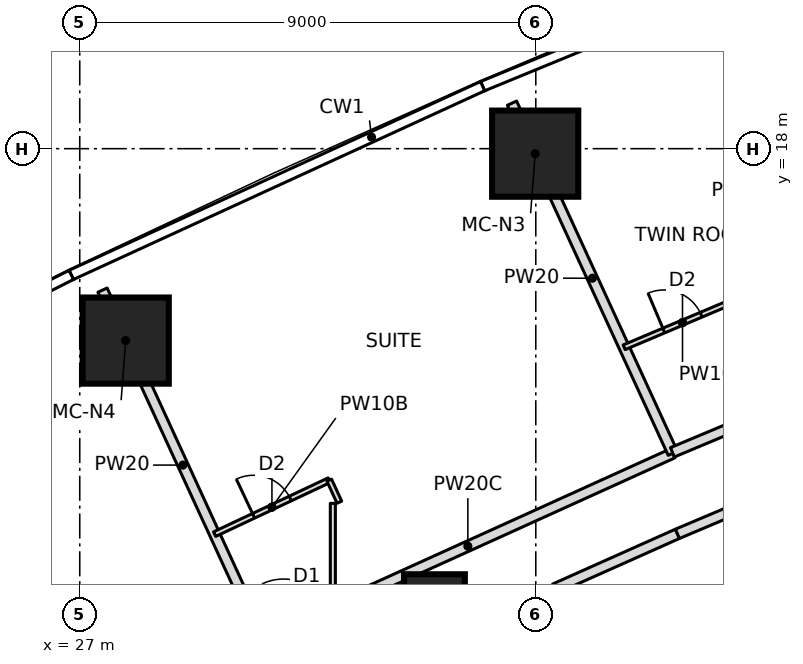
"""IFC4 building model, lengths in metres.
Left out: names, types, materials, properties, quantities, classifications, styles, units other than length and angle.
Written with IfcOpenShell. Run it as: python <this file> out.ifc"""

import sys

from ifc_helpers import new_model, si_unit, direction, frame, frame_2d, origin, origin_2d, place, context, subcontext, project, spatial, rectangle, extrude, element, fill, save


model = new_model("IFC4")
c1 = context("Model", 3, precision=1e-05, world=origin(), true_north=direction((0.0, 1.0)))
c2 = subcontext(c1, "Body", "Model", "MODEL_VIEW")
j1 = project(units=[si_unit("LENGTHUNIT", "METRE"), si_unit("PLANEANGLEUNIT", "RADIAN")], contexts=[c1])
p1 = place(None, origin())
s1 = spatial("IfcSite", under=j1, at=p1, CompositionType="ELEMENT")
p2 = place(p1, origin())
s2 = spatial("IfcBuilding", under=s1, at=p2, CompositionType="ELEMENT")
p3 = place(p2, frame((0.0, 0.0, 99.1)))
s3 = spatial("IfcBuildingStorey", under=s2, at=p3, CompositionType="ELEMENT", Elevation=99.1)
for number, where, z_axis, x_axis in (
    (1, (35.988, 17.902, 0.0), (0.0, 0.0, 1.0), (1.0, 0.0, 0.0)),
    (2, (27.907, 14.212, 0.0), (0.0, 0.0, 1.0), (1.0, 0.0, 0.0)),
):
    element("IfcColumn", number, at=place(p3, frame(where, z_axis=z_axis, x_axis=x_axis)), inside=s3, PredefinedType="COLUMN", context=c2, shape_type="SweptSolid", body=[
        extrude(rectangle(XDim=1.7, YDim=1.7, at=origin_2d()), origin(), (0.0, 0.0, 1.0), 3.55),
    ])
p4 = place(p3, frame((34.0, 9.0, 0.0), z_axis=(0.0, 0.0, 1.0), x_axis=(1.0, 0.0, 0.0)))
e3 = element("IfcColumn", 3, at=p4, inside=s3, PredefinedType="COLUMN", context=c2, shape_type="SweptSolid", body=[
    extrude(rectangle(XDim=1.2, YDim=1.2, at=origin_2d()), origin(), (0.0, 0.0, 1.0), 3.55),
])
p5 = place(p3, frame((30.622, 8.302, 0.0), z_axis=(0.0, 0.0, 1.0), x_axis=(-0.417429919618, 0.90870911859, 0.0)))
e4 = element("IfcWall", 4, at=p5, inside=s3, PredefinedType="PARTITIONING", context=c2, shape_type="SweptSolid", body=[
    extrude(rectangle(XDim=7.6, YDim=0.2, at=frame_2d((3.8, 0.0))), origin(), (0.0, 0.0, 1.0), 3.25),
])
p6 = place(p3, frame((30.614, 8.32, 0.0), z_axis=(0.0, 0.0, 1.0), x_axis=(0.910751030363, 0.41295588226, 0.0)))
e5 = element("IfcWall", 5, at=p6, inside=s3, PredefinedType="PARTITIONING", context=c2, shape_type="SweptSolid", body=[
    extrude(rectangle(XDim=8.883, YDim=0.2, at=frame_2d((4.442, 0.0))), origin(), (0.0, 0.0, 1.0), 3.25),
])
p7 = place(p6, frame((0.45, 0.0, 0.0)))
e6 = element("IfcOpeningElement", 6, at=p7, cuts=e5, PredefinedType="OPENING", context=c2, shape_type="SweptSolid", body=[
    extrude(rectangle(XDim=1.0, YDim=2.1, at=frame_2d((0.5, 1.05))), frame((0.0, 0.11, 0.0), z_axis=(0.0, -1.0, 0.0), x_axis=(1.0, 0.0, 0.0)), (0.0, 0.0, 1.0), 0.22),
])
p8 = place(p3, frame((29.662, 10.392, 0.0), z_axis=(0.0, 0.0, 1.0), x_axis=(0.904688082375, 0.426074493027, 0.0)))
e7 = element("IfcWall", 7, at=p8, inside=s3, PredefinedType="PARTITIONING", context=c2, shape_type="SweptSolid", body=[
    extrude(rectangle(XDim=2.5, YDim=0.1, at=frame_2d((1.25, 0.0))), origin(), (0.0, 0.0, 1.0), 3.25),
])
p9 = place(p8, frame((0.85, 0.0, 0.0)))
e8 = element("IfcOpeningElement", 8, at=p9, cuts=e7, PredefinedType="OPENING", context=c2, shape_type="SweptSolid", body=[
    extrude(rectangle(XDim=0.8, YDim=2.1, at=frame_2d((0.4, 1.05))), frame((0.0, 0.06, 0.0), z_axis=(0.0, -1.0, 0.0), x_axis=(1.0, 0.0, 0.0)), (0.0, 0.0, 1.0), 0.12),
])
p10 = place(p3, frame((31.924, 11.457, 0.0), z_axis=(0.0, 0.0, 1.0), x_axis=(0.4176025781, -0.908629785316, 0.0)))
e9 = element("IfcWall", 9, at=p10, inside=s3, PredefinedType="PARTITIONING", context=c2, shape_type="SweptSolid", body=[
    extrude(rectangle(XDim=0.479, YDim=0.1, at=frame_2d((0.239, 0.0))), origin(), (0.0, 0.0, 1.0), 3.25),
])
p11 = place(p3, frame((38.704, 11.989, 0.0), z_axis=(0.0, 0.0, 1.0), x_axis=(-0.417416334044, 0.908715359215, 0.0)))
e10 = element("IfcWall", 10, at=p11, inside=s3, PredefinedType="PARTITIONING", context=c2, shape_type="SweptSolid", body=[
    extrude(rectangle(XDim=7.604, YDim=0.2, at=frame_2d((3.802, 0.0))), origin(), (0.0, 0.0, 1.0), 3.25),
])
p12 = place(p3, frame((42.791, 13.724, 0.0), z_axis=(0.0, 0.0, 1.0), x_axis=(-0.922230433067, -0.386640696675, 0.0)))
e11 = element("IfcWall", 11, at=p12, inside=s3, PredefinedType="PARTITIONING", context=c2, shape_type="SweptSolid", body=[
    extrude(rectangle(XDim=4.44, YDim=0.2, at=frame_2d((2.22, 0.0))), origin(), (0.0, 0.0, 1.0), 3.25),
])
p13 = place(p12, frame((0.45, 0.0, 0.0)))
e12 = element("IfcOpeningElement", 12, at=p13, cuts=e11, PredefinedType="OPENING", context=c2, shape_type="SweptSolid", body=[
    extrude(rectangle(XDim=1.0, YDim=2.1, at=frame_2d((0.5, 1.05))), frame((0.0, 0.11, 0.0), z_axis=(0.0, -1.0, 0.0), x_axis=(1.0, 0.0, 0.0)), (0.0, 0.0, 1.0), 0.22),
])
p14 = place(p3, frame((37.744, 14.08, 0.0), z_axis=(0.0, 0.0, 1.0), x_axis=(0.921042675983, 0.38946166566, 0.0)))
e13 = element("IfcWall", 13, at=p14, inside=s3, PredefinedType="PARTITIONING", context=c2, shape_type="SweptSolid", body=[
    extrude(rectangle(XDim=2.501, YDim=0.1, at=frame_2d((1.25, 0.0))), origin(), (0.0, 0.0, 1.0), 3.25),
])
p15 = place(p14, frame((0.85, 0.0, 0.0)))
e14 = element("IfcOpeningElement", 14, at=p15, cuts=e13, PredefinedType="OPENING", context=c2, shape_type="SweptSolid", body=[
    extrude(rectangle(XDim=0.8, YDim=2.1, at=frame_2d((0.4, 1.05))), frame((0.0, 0.06, 0.0), z_axis=(0.0, -1.0, 0.0), x_axis=(1.0, 0.0, 0.0)), (0.0, 0.0, 1.0), 0.12),
])
p16 = place(p3, frame((42.799, 13.705, 0.0), z_axis=(0.0, 0.0, 1.0), x_axis=(-0.417427858403, 0.908710065438, 0.0)))
e15 = element("IfcWall", 15, at=p16, inside=s3, PredefinedType="PARTITIONING", context=c2, shape_type="SweptSolid", body=[
    extrude(rectangle(XDim=7.61, YDim=0.2, at=frame_2d((3.805, 0.0))), origin(), (0.0, 0.0, 1.0), 3.25),
])
p17 = place(p3, frame((38.792, 10.397, 0.0), z_axis=(0.0, 0.0, 1.0), x_axis=(0.921037415532, 0.389474105929, 0.0)))
e16 = element("IfcWall", 16, at=p17, inside=s3, PredefinedType="PARTITIONING", context=c2, shape_type="SweptSolid", body=[
    extrude(rectangle(XDim=4.273, YDim=0.2, at=frame_2d((2.137, 0.0))), origin(), (0.0, 0.0, 1.0), 3.25),
])
p18 = place(p17, frame((1.636, 0.0, 0.0)))
e17 = element("IfcOpeningElement", 17, at=p18, cuts=e16, PredefinedType="OPENING", context=c2, shape_type="SweptSolid", body=[
    extrude(rectangle(XDim=1.0, YDim=2.1, at=frame_2d((0.5, 1.05))), frame((0.0, 0.11, 0.0), z_axis=(0.0, -1.0, 0.0), x_axis=(1.0, 0.0, 0.0)), (0.0, 0.0, 1.0), 0.22),
])
p19 = place(p3, frame((36.374, 9.317, 0.0), z_axis=(0.0, 0.0, 1.0), x_axis=(0.913030623494, 0.407891015544, 0.0)))
e18 = element("IfcWall", 18, at=p19, inside=s3, PredefinedType="PARTITIONING", context=c2, shape_type="SweptSolid", body=[
    extrude(rectangle(XDim=2.648, YDim=0.2, at=frame_2d((1.324, 0.0))), origin(), (0.0, 0.0, 1.0), 3.25),
])
p20 = place(p3, frame((31.995, 11.0, 0.0), z_axis=(0.0, 0.0, 1.0), x_axis=(0.0, -1.0, 0.0)))
e19 = element("IfcWall", 19, at=p20, inside=s3, PredefinedType="PARTITIONING", context=c2, shape_type="SweptSolid", body=[
    extrude(rectangle(XDim=2.046, YDim=0.1, at=frame_2d((1.023, 0.0))), origin(), (0.0, 0.0, 1.0), 3.25),
])
p21 = place(p9, origin())
e20 = element("IfcDoor", 20, at=p21, inside=s3, OperationType="SINGLE_SWING_LEFT", PredefinedType="DOOR", context=c2, shape_type="SweptSolid", body=[
    extrude(rectangle(XDim=0.8, YDim=2.1, at=frame_2d((0.4, 1.05))), frame((0.0, 0.025, 0.0), z_axis=(0.0, -1.0, 0.0), x_axis=(1.0, 0.0, 0.0)), (0.0, 0.0, 1.0), 0.05),
])
fill(e8, e20)
p22 = place(p15, origin())
e21 = element("IfcDoor", 21, at=p22, inside=s3, OperationType="SINGLE_SWING_LEFT", PredefinedType="DOOR", context=c2, shape_type="SweptSolid", body=[
    extrude(rectangle(XDim=0.8, YDim=2.1, at=frame_2d((0.4, 1.05))), frame((0.0, 0.025, 0.0), z_axis=(0.0, -1.0, 0.0), x_axis=(1.0, 0.0, 0.0)), (0.0, 0.0, 1.0), 0.05),
])
fill(e14, e21)
save(model, sys.argv[1])
